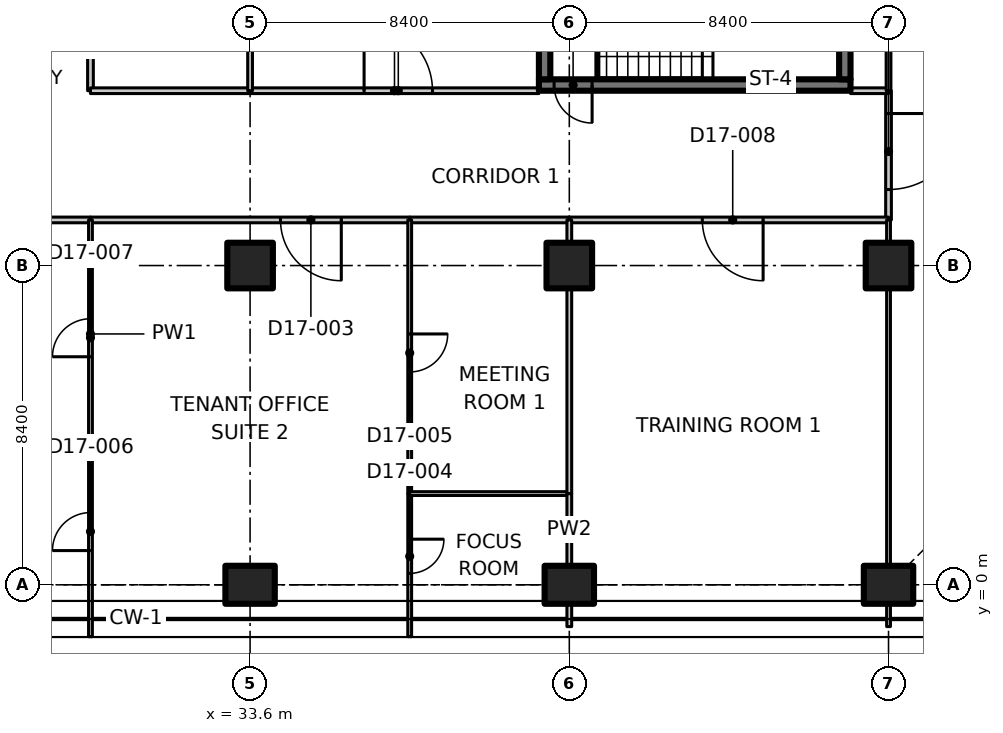
"""IFC4 building model, lengths in metres.
Left out: names, types, materials, properties, quantities, classifications, styles, units other than length and angle.
Written with IfcOpenShell. Run it as: python <this file> out.ifc"""

import sys

from ifc_helpers import new_model, si_unit, direction, frame, frame_2d, origin, origin_2d, place, context, subcontext, project, spatial, polyline, rectangle, outline, extrude, element, fill, save


model = new_model("IFC4")
c1 = context("Model", 3, precision=1e-05, world=origin(), true_north=direction((0.0, 1.0)))
c2 = subcontext(c1, "Body", "Model", "MODEL_VIEW")
j1 = project(units=[si_unit("LENGTHUNIT", "METRE"), si_unit("PLANEANGLEUNIT", "RADIAN")], contexts=[c1])
p1 = place(None, origin())
s1 = spatial("IfcSite", under=j1, at=p1, CompositionType="ELEMENT")
p2 = place(p1, origin())
s2 = spatial("IfcBuilding", under=s1, at=p2, CompositionType="ELEMENT")
p3 = place(p2, frame((0.0, 0.0, 138.5)))
s3 = spatial("IfcBuildingStorey", under=s2, at=p3, CompositionType="ELEMENT", Elevation=138.5)
p4 = place(p3, frame((33.6, 0.0, 0.0), z_axis=(0.0, 0.0, 1.0), x_axis=(0.0, 1.0, 0.0)))
e1 = element("IfcColumn", 1, at=p4, inside=s3, PredefinedType="COLUMN", context=c2, shape_type="SweptSolid", body=[
    extrude(rectangle(XDim=1.0, YDim=1.3, at=origin_2d()), origin(), (0.0, 0.0, 1.0), 3.35),
])
p5 = place(p3, frame((33.6, 8.4, 0.0), z_axis=(0.0, 0.0, 1.0), x_axis=(1.0, 0.0, 0.0)))
e2 = element("IfcColumn", 2, at=p5, inside=s3, PredefinedType="COLUMN", context=c2, shape_type="SweptSolid", body=[
    extrude(rectangle(XDim=1.2, YDim=1.2, at=origin_2d()), origin(), (0.0, 0.0, 1.0), 3.35),
])
p6 = place(p3, frame((42.0, 0.0, 0.0), z_axis=(0.0, 0.0, 1.0), x_axis=(0.0, 1.0, 0.0)))
e3 = element("IfcColumn", 3, at=p6, inside=s3, PredefinedType="COLUMN", context=c2, shape_type="SweptSolid", body=[
    extrude(rectangle(XDim=1.0, YDim=1.3, at=origin_2d()), origin(), (0.0, 0.0, 1.0), 3.35),
])
p7 = place(p3, frame((42.0, 8.4, 0.0), z_axis=(0.0, 0.0, 1.0), x_axis=(1.0, 0.0, 0.0)))
e4 = element("IfcColumn", 4, at=p7, inside=s3, PredefinedType="COLUMN", context=c2, shape_type="SweptSolid", body=[
    extrude(rectangle(XDim=1.2, YDim=1.2, at=origin_2d()), origin(), (0.0, 0.0, 1.0), 3.35),
])
p8 = place(p3, frame((50.4, 0.0, 0.0), z_axis=(0.0, 0.0, 1.0), x_axis=(0.0, 1.0, 0.0)))
e5 = element("IfcColumn", 5, at=p8, inside=s3, PredefinedType="COLUMN", context=c2, shape_type="SweptSolid", body=[
    extrude(rectangle(XDim=1.0, YDim=1.3, at=origin_2d()), origin(), (0.0, 0.0, 1.0), 3.35),
])
p9 = place(p3, frame((50.4, 8.4, 0.0), z_axis=(0.0, 0.0, 1.0), x_axis=(1.0, 0.0, 0.0)))
e6 = element("IfcColumn", 6, at=p9, inside=s3, PredefinedType="COLUMN", context=c2, shape_type="SweptSolid", body=[
    extrude(rectangle(XDim=1.2, YDim=1.2, at=origin_2d()), origin(), (0.0, 0.0, 1.0), 3.35),
])
p10 = place(p3, frame((49.4, 13.15, 0.0), z_axis=(0.0, 0.0, 1.0), x_axis=(-1.0, 0.0, 0.0)))
e7 = element("IfcWall", 7, at=p10, inside=s3, PredefinedType="SHEAR", context=c2, shape_type="SweptSolid", body=[
    extrude(rectangle(XDim=8.2, YDim=0.3, at=frame_2d((4.1, 0.0))), origin(), (0.0, 0.0, 1.0), 3.35),
])
p11 = place(p10, frame((6.8, 0.0, 0.0)))
e8 = element("IfcOpeningElement", 8, at=p11, cuts=e7, PredefinedType="OPENING", context=c2, shape_type="SweptSolid", body=[
    extrude(rectangle(XDim=1.0, YDim=2.1, at=frame_2d((0.5, 1.05))), frame((0.0, 0.16, 0.0), z_axis=(0.0, -1.0, 0.0), x_axis=(1.0, 0.0, 0.0)), (0.0, 0.0, 1.0), 0.32),
])
for number, where, z_axis, x_axis in (
    (9, (41.35, 13.3, 0.0), (0.0, 0.0, 1.0), (0.0, 1.0, 0.0)),
    (10, (49.25, 13.3, 0.0), (0.0, 0.0, 1.0), (0.0, 1.0, 0.0)),
):
    element("IfcWall", number, at=place(p3, frame(where, z_axis=z_axis, x_axis=x_axis)), inside=s3, PredefinedType="SHEAR", context=c2, shape_type="SweptSolid", body=[
        extrude(rectangle(XDim=2.55, YDim=0.3, at=frame_2d((1.275, 0.0))), origin(), (0.0, 0.0, 1.0), 3.35),
    ])
p12 = place(p3, frame((29.4, 9.6, 0.0), z_axis=(0.0, 0.0, 1.0), x_axis=(-1.0, 0.0, 0.0)))
e11 = element("IfcWall", 11, at=p12, inside=s3, PredefinedType="PARTITIONING", context=c2, shape_type="SweptSolid", body=[
    extrude(rectangle(XDim=4.2, YDim=0.15, at=frame_2d((2.1, 0.0))), origin(), (0.0, 0.0, 1.0), 3.33),
])
p13 = place(p3, frame((29.4, 21.2, 0.0), z_axis=(0.0, 0.0, 1.0), x_axis=(0.0, -1.0, 0.0)))
e12 = element("IfcWall", 12, at=p13, inside=s3, PredefinedType="PARTITIONING", context=c2, shape_type="SweptSolid", body=[
    extrude(rectangle(XDim=8.2, YDim=0.15, at=frame_2d((4.1, 0.0))), origin(), (0.0, 0.0, 1.0), 3.33),
])
p14 = place(p13, frame((3.3, 0.0, 0.0)))
e13 = element("IfcOpeningElement", 13, at=p14, cuts=e12, PredefinedType="OPENING", context=c2, shape_type="SweptSolid", body=[
    extrude(rectangle(XDim=1.6, YDim=2.1, at=frame_2d((0.8, 1.05))), frame((0.0, 0.085, 0.0), z_axis=(0.0, -1.0, 0.0), x_axis=(1.0, 0.0, 0.0)), (0.0, 0.0, 1.0), 0.17),
])
p15 = place(p3, frame((50.4, 13.0, 0.0), z_axis=(0.0, 0.0, 1.0), x_axis=(0.0, -1.0, 0.0)))
e14 = element("IfcWall", 14, at=p15, inside=s3, PredefinedType="PARTITIONING", context=c2, shape_type="SweptSolid", body=[
    extrude(rectangle(XDim=3.4, YDim=0.15, at=frame_2d((1.7, 0.0))), origin(), (0.0, 0.0, 1.0), 3.33),
])
p16 = place(p15, frame((0.6, 0.0, 0.0)))
e15 = element("IfcOpeningElement", 15, at=p16, cuts=e14, PredefinedType="OPENING", context=c2, shape_type="SweptSolid", body=[
    extrude(rectangle(XDim=2.0, YDim=2.4, at=frame_2d((1.0, 1.2))), frame((0.0, 0.085, 0.0), z_axis=(0.0, -1.0, 0.0), x_axis=(1.0, 0.0, 0.0)), (0.0, 0.0, 1.0), 0.17),
])
p17 = place(p3, frame((37.8, 9.6, 0.0), z_axis=(0.0, 0.0, 1.0), x_axis=(-1.0, 0.0, 0.0)))
e16 = element("IfcWall", 16, at=p17, inside=s3, PredefinedType="PARTITIONING", context=c2, shape_type="SweptSolid", body=[
    extrude(rectangle(XDim=8.4, YDim=0.15, at=frame_2d((4.2, 0.0))), origin(), (0.0, 0.0, 1.0), 3.33),
])
p18 = place(p17, frame((1.8, 0.0, 0.0)))
e17 = element("IfcOpeningElement", 17, at=p18, cuts=e16, PredefinedType="OPENING", context=c2, shape_type="SweptSolid", body=[
    extrude(rectangle(XDim=1.6, YDim=2.1, at=frame_2d((0.8, 1.05))), frame((0.0, 0.085, 0.0), z_axis=(0.0, -1.0, 0.0), x_axis=(1.0, 0.0, 0.0)), (0.0, 0.0, 1.0), 0.17),
])
p19 = place(p3, frame((42.0, 9.6, 0.0), z_axis=(0.0, 0.0, 1.0), x_axis=(-1.0, 0.0, 0.0)))
e18 = element("IfcWall", 18, at=p19, inside=s3, PredefinedType="PARTITIONING", context=c2, shape_type="SweptSolid", body=[
    extrude(rectangle(XDim=4.2, YDim=0.15, at=frame_2d((2.1, 0.0))), origin(), (0.0, 0.0, 1.0), 3.33),
])
p20 = place(p3, frame((50.4, 9.6, 0.0), z_axis=(0.0, 0.0, 1.0), x_axis=(-1.0, 0.0, 0.0)))
e19 = element("IfcWall", 19, at=p20, inside=s3, PredefinedType="PARTITIONING", context=c2, shape_type="SweptSolid", body=[
    extrude(rectangle(XDim=8.4, YDim=0.15, at=frame_2d((4.2, 0.0))), origin(), (0.0, 0.0, 1.0), 3.33),
])
p21 = place(p20, frame((3.3, 0.0, 0.0)))
e20 = element("IfcOpeningElement", 20, at=p21, cuts=e19, PredefinedType="OPENING", context=c2, shape_type="SweptSolid", body=[
    extrude(rectangle(XDim=1.6, YDim=2.1, at=frame_2d((0.8, 1.05))), frame((0.0, 0.085, 0.0), z_axis=(0.0, -1.0, 0.0), x_axis=(1.0, 0.0, 0.0)), (0.0, 0.0, 1.0), 0.17),
])
p22 = place(p3, frame((29.4, 13.0, 0.0), z_axis=(0.0, 0.0, 1.0), x_axis=(1.0, 0.0, 0.0)))
e21 = element("IfcWall", 21, at=p22, inside=s3, PredefinedType="PARTITIONING", context=c2, shape_type="SweptSolid", body=[
    extrude(rectangle(XDim=4.2, YDim=0.15, at=frame_2d((2.1, 0.0))), origin(), (0.0, 0.0, 1.0), 3.33),
])
p23 = place(p3, frame((33.6, 13.0, 0.0), z_axis=(0.0, 0.0, 1.0), x_axis=(1.0, 0.0, 0.0)))
e22 = element("IfcWall", 22, at=p23, inside=s3, PredefinedType="PARTITIONING", context=c2, shape_type="SweptSolid", body=[
    extrude(rectangle(XDim=7.6, YDim=0.15, at=frame_2d((3.8, 0.0))), origin(), (0.0, 0.0, 1.0), 3.33),
])
p24 = place(p23, frame((3.0, 0.0, 0.0)))
e23 = element("IfcOpeningElement", 23, at=p24, cuts=e22, PredefinedType="OPENING", context=c2, shape_type="SweptSolid", body=[
    extrude(rectangle(XDim=1.8, YDim=2.1, at=frame_2d((0.9, 1.05))), frame((0.0, 0.085, 0.0), z_axis=(0.0, -1.0, 0.0), x_axis=(1.0, 0.0, 0.0)), (0.0, 0.0, 1.0), 0.17),
])
p25 = place(p3, frame((49.4, 13.0, 0.0), z_axis=(0.0, 0.0, 1.0), x_axis=(1.0, 0.0, 0.0)))
e24 = element("IfcWall", 24, at=p25, inside=s3, PredefinedType="PARTITIONING", context=c2, shape_type="SweptSolid", body=[
    extrude(rectangle(XDim=1.0, YDim=0.15, at=frame_2d((0.5, 0.0))), origin(), (0.0, 0.0, 1.0), 3.33),
])
p26 = place(p3, frame((50.4, -1.1, 0.0), z_axis=(0.0, 0.0, 1.0), x_axis=(0.0, 1.0, 0.0)))
e25 = element("IfcWall", 25, at=p26, inside=s3, PredefinedType="PARTITIONING", context=c2, shape_type="SweptSolid", body=[
    extrude(rectangle(XDim=0.58, YDim=0.1, at=frame_2d((0.29, 0.0))), origin(), (0.0, 0.0, 1.0), 3.33),
])
p27 = place(p3, frame((50.4, 0.52, 0.0), z_axis=(0.0, 0.0, 1.0), x_axis=(0.0, 1.0, 0.0)))
e26 = element("IfcWall", 26, at=p27, inside=s3, PredefinedType="PARTITIONING", context=c2, shape_type="SweptSolid", body=[
    extrude(outline(polyline([(0.0, 0.0), (7.26, 0.0), (7.26, 3.33), (0.146, 3.33), (0.144, 2.98), (0.0, 2.98), (0.0, 0.0)])), frame((0.0, 0.05, 0.0), z_axis=(0.0, -1.0, 0.0), x_axis=(1.0, 0.0, 0.0)), (0.0, 0.0, 1.0), 0.1),
])
p28 = place(p3, frame((50.4, 9.02, 0.0), z_axis=(0.0, 0.0, 1.0), x_axis=(0.0, 1.0, 0.0)))
e27 = element("IfcWall", 27, at=p28, inside=s3, PredefinedType="PARTITIONING", context=c2, shape_type="SweptSolid", body=[
    extrude(rectangle(XDim=0.58, YDim=0.1, at=frame_2d((0.29, 0.0))), origin(), (0.0, 0.0, 1.0), 3.33),
])
p29 = place(p3, frame((50.4, 13.0, 0.0), z_axis=(0.0, 0.0, 1.0), x_axis=(0.0, 1.0, 0.0)))
e28 = element("IfcWall", 28, at=p29, inside=s3, PredefinedType="PARTITIONING", context=c2, shape_type="SweptSolid", body=[
    extrude(rectangle(XDim=3.18, YDim=0.125, at=frame_2d((1.59, 0.0))), origin(), (0.0, 0.0, 1.0), 3.33),
])
p30 = place(p3, frame((37.8, 2.4, 0.0), z_axis=(0.0, 0.0, 1.0), x_axis=(0.0, -1.0, 0.0)))
e29 = element("IfcWall", 29, at=p30, inside=s3, PredefinedType="PARTITIONING", context=c2, shape_type="SweptSolid", body=[
    extrude(rectangle(XDim=3.765, YDim=0.1, at=frame_2d((1.882, 0.0))), origin(), (0.0, 0.0, 1.0), 2.98),
])
p31 = place(p30, frame((1.2, 0.0, 0.0)))
e30 = element("IfcOpeningElement", 30, at=p31, cuts=e29, PredefinedType="OPENING", context=c2, shape_type="SweptSolid", body=[
    extrude(rectangle(XDim=0.9, YDim=2.1, at=frame_2d((0.45, 1.05))), frame((0.0, 0.06, 0.0), z_axis=(0.0, -1.0, 0.0), x_axis=(1.0, 0.0, 0.0)), (0.0, 0.0, 1.0), 0.12),
])
p32 = place(p3, frame((37.8, 9.6, 0.0), z_axis=(0.0, 0.0, 1.0), x_axis=(0.0, -1.0, 0.0)))
e31 = element("IfcWall", 31, at=p32, inside=s3, PredefinedType="PARTITIONING", context=c2, shape_type="SweptSolid", body=[
    extrude(rectangle(XDim=7.2, YDim=0.1, at=frame_2d((3.6, 0.0))), origin(), (0.0, 0.0, 1.0), 3.33),
])
p33 = place(p32, frame((3.0, 0.0, 0.0)))
e32 = element("IfcOpeningElement", 32, at=p33, cuts=e31, PredefinedType="OPENING", context=c2, shape_type="SweptSolid", body=[
    extrude(rectangle(XDim=1.0, YDim=2.1, at=frame_2d((0.5, 1.05))), frame((0.0, 0.06, 0.0), z_axis=(0.0, -1.0, 0.0), x_axis=(1.0, 0.0, 0.0)), (0.0, 0.0, 1.0), 0.12),
])
p34 = place(p3, frame((29.4, -1.365, 0.0), z_axis=(0.0, 0.0, 1.0), x_axis=(0.0, 1.0, 0.0)))
e33 = element("IfcWall", 33, at=p34, inside=s3, PredefinedType="PARTITIONING", context=c2, shape_type="SweptSolid", body=[
    extrude(outline(polyline([(0.0, 0.0), (4.965, 0.0), (4.965, 3.33), (1.815, 3.33), (1.813, 2.98), (0.917, 2.98), (0.915, 3.33), (0.265, 3.33), (0.0, 3.33), (0.0, 0.0)])), frame((0.0, 0.05, 0.0), z_axis=(0.0, -1.0, 0.0), x_axis=(1.0, 0.0, 0.0)), (0.0, 0.0, 1.0), 0.1),
])
p35 = place(p34, frame((2.265, 0.0, 0.0)))
e34 = element("IfcOpeningElement", 34, at=p35, cuts=e33, PredefinedType="OPENING", context=c2, shape_type="SweptSolid", body=[
    extrude(rectangle(XDim=1.0, YDim=2.1, at=frame_2d((0.5, 1.05))), frame((0.0, 0.06, 0.0), z_axis=(0.0, -1.0, 0.0), x_axis=(1.0, 0.0, 0.0)), (0.0, 0.0, 1.0), 0.12),
])
p36 = place(p3, frame((29.4, 3.6, 0.0), z_axis=(0.0, 0.0, 1.0), x_axis=(0.0, 1.0, 0.0)))
e35 = element("IfcWall", 35, at=p36, inside=s3, PredefinedType="PARTITIONING", context=c2, shape_type="SweptSolid", body=[
    extrude(rectangle(XDim=6.0, YDim=0.1, at=frame_2d((3.0, 0.0))), origin(), (0.0, 0.0, 1.0), 3.33),
])
p37 = place(p36, frame((2.4, 0.0, 0.0)))
e36 = element("IfcOpeningElement", 36, at=p37, cuts=e35, PredefinedType="OPENING", context=c2, shape_type="SweptSolid", body=[
    extrude(rectangle(XDim=1.0, YDim=2.1, at=frame_2d((0.5, 1.05))), frame((0.0, 0.06, 0.0), z_axis=(0.0, -1.0, 0.0), x_axis=(1.0, 0.0, 0.0)), (0.0, 0.0, 1.0), 0.12),
])
p38 = place(p3, frame((37.8, 2.4, 0.0), z_axis=(0.0, 0.0, 1.0), x_axis=(1.0, 0.0, 0.0)))
e37 = element("IfcWall", 37, at=p38, inside=s3, PredefinedType="PARTITIONING", context=c2, shape_type="SweptSolid", body=[
    extrude(rectangle(XDim=4.2, YDim=0.1, at=frame_2d((2.1, 0.0))), origin(), (0.0, 0.0, 1.0), 3.33),
])
p39 = place(p3, frame((42.0, 2.4, 0.0), z_axis=(0.0, 0.0, 1.0), x_axis=(0.0, -1.0, 0.0)))
e38 = element("IfcWall", 38, at=p39, inside=s3, PredefinedType="PARTITIONING", context=c2, shape_type="SweptSolid", body=[
    extrude(rectangle(XDim=1.88, YDim=0.125, at=frame_2d((0.94, 0.0))), origin(), (0.0, 0.0, 1.0), 3.33),
])
for number, where, z_axis, x_axis in (
    (39, (42.0, -0.52, 0.0), (0.0, 0.0, 1.0), (0.0, -1.0, 0.0)),
    (40, (42.0, 9.6, 0.0), (0.0, 0.0, 1.0), (0.0, -1.0, 0.0)),
):
    element("IfcWall", number, at=place(p3, frame(where, z_axis=z_axis, x_axis=x_axis)), inside=s3, PredefinedType="PARTITIONING", context=c2, shape_type="SweptSolid", body=[
        extrude(rectangle(XDim=0.58, YDim=0.125, at=frame_2d((0.29, 0.0))), origin(), (0.0, 0.0, 1.0), 3.33),
    ])
p40 = place(p3, frame((42.0, 7.78, 0.0), z_axis=(0.0, 0.0, 1.0), x_axis=(0.0, -1.0, 0.0)))
e41 = element("IfcWall", 41, at=p40, inside=s3, PredefinedType="PARTITIONING", context=c2, shape_type="SweptSolid", body=[
    extrude(rectangle(XDim=5.38, YDim=0.125, at=frame_2d((2.69, 0.0))), origin(), (0.0, 0.0, 1.0), 3.33),
])
p41 = place(p3, frame((25.2, 3.6, 0.0), z_axis=(0.0, 0.0, 1.0), x_axis=(1.0, 0.0, 0.0)))
e42 = element("IfcWall", 42, at=p41, inside=s3, PredefinedType="PARTITIONING", context=c2, shape_type="SweptSolid", body=[
    extrude(rectangle(XDim=4.2, YDim=0.1, at=frame_2d((2.1, 0.0))), origin(), (0.0, 0.0, 1.0), 3.33),
])
p42 = place(p3, frame((33.6, 16.18, 0.0), z_axis=(0.0, 0.0, 1.0), x_axis=(0.0, -1.0, 0.0)))
e43 = element("IfcWall", 43, at=p42, inside=s3, PredefinedType="PARTITIONING", context=c2, shape_type="SweptSolid", body=[
    extrude(rectangle(XDim=3.18, YDim=0.125, at=frame_2d((1.59, 0.0))), origin(), (0.0, 0.0, 1.0), 3.33),
])
p43 = place(p11, origin())
e44 = element("IfcDoor", 44, at=p43, inside=s3, OperationType="SINGLE_SWING_LEFT", PredefinedType="DOOR", context=c2, shape_type="SweptSolid", body=[
    extrude(rectangle(XDim=1.0, YDim=2.1, at=frame_2d((0.5, 1.05))), frame((0.0, 0.025, 0.0), z_axis=(0.0, -1.0, 0.0), x_axis=(1.0, 0.0, 0.0)), (0.0, 0.0, 1.0), 0.05),
])
fill(e8, e44)
p44 = place(p16, origin())
e45 = element("IfcDoor", 45, at=p44, inside=s3, OperationType="DOUBLE_DOOR_SINGLE_SWING", PredefinedType="DOOR", context=c2, shape_type="SweptSolid", body=[
    extrude(rectangle(XDim=2.0, YDim=2.4, at=frame_2d((1.0, 1.2))), frame((0.0, 0.025, 0.0), z_axis=(0.0, -1.0, 0.0), x_axis=(1.0, 0.0, 0.0)), (0.0, 0.0, 1.0), 0.05),
])
fill(e15, e45)
p45 = place(p18, origin())
e46 = element("IfcDoor", 46, at=p45, inside=s3, OperationType="DOUBLE_DOOR_SINGLE_SWING", PredefinedType="DOOR", context=c2, shape_type="SweptSolid", body=[
    extrude(rectangle(XDim=1.6, YDim=2.1, at=frame_2d((0.8, 1.05))), frame((0.0, 0.025, 0.0), z_axis=(0.0, -1.0, 0.0), x_axis=(1.0, 0.0, 0.0)), (0.0, 0.0, 1.0), 0.05),
])
fill(e17, e46)
p46 = place(p31, origin())
e47 = element("IfcDoor", 47, at=p46, inside=s3, OperationType="SINGLE_SWING_LEFT", PredefinedType="DOOR", context=c2, shape_type="SweptSolid", body=[
    extrude(rectangle(XDim=0.9, YDim=2.1, at=frame_2d((0.45, 1.05))), frame((0.0, 0.025, 0.0), z_axis=(0.0, -1.0, 0.0), x_axis=(1.0, 0.0, 0.0)), (0.0, 0.0, 1.0), 0.05),
])
fill(e30, e47)
p47 = place(p33, origin())
e48 = element("IfcDoor", 48, at=p47, inside=s3, OperationType="SINGLE_SWING_LEFT", PredefinedType="DOOR", context=c2, shape_type="SweptSolid", body=[
    extrude(rectangle(XDim=1.0, YDim=2.1, at=frame_2d((0.5, 1.05))), frame((0.0, 0.025, 0.0), z_axis=(0.0, -1.0, 0.0), x_axis=(1.0, 0.0, 0.0)), (0.0, 0.0, 1.0), 0.05),
])
fill(e32, e48)
p48 = place(p35, origin())
e49 = element("IfcDoor", 49, at=p48, inside=s3, OperationType="SINGLE_SWING_LEFT", PredefinedType="DOOR", context=c2, shape_type="SweptSolid", body=[
    extrude(rectangle(XDim=1.0, YDim=2.1, at=frame_2d((0.5, 1.05))), frame((0.0, 0.025, 0.0), z_axis=(0.0, -1.0, 0.0), x_axis=(1.0, 0.0, 0.0)), (0.0, 0.0, 1.0), 0.05),
])
fill(e34, e49)
p49 = place(p37, origin())
e50 = element("IfcDoor", 50, at=p49, inside=s3, OperationType="SINGLE_SWING_LEFT", PredefinedType="DOOR", context=c2, shape_type="SweptSolid", body=[
    extrude(rectangle(XDim=1.0, YDim=2.1, at=frame_2d((0.5, 1.05))), frame((0.0, 0.025, 0.0), z_axis=(0.0, -1.0, 0.0), x_axis=(1.0, 0.0, 0.0)), (0.0, 0.0, 1.0), 0.05),
])
fill(e36, e50)
p50 = place(p21, origin())
e51 = element("IfcDoor", 51, at=p50, inside=s3, OperationType="DOUBLE_DOOR_SINGLE_SWING", PredefinedType="DOOR", context=c2, shape_type="SweptSolid", body=[
    extrude(rectangle(XDim=1.6, YDim=2.1, at=frame_2d((0.8, 1.05))), frame((0.0, 0.025, 0.0), z_axis=(0.0, -1.0, 0.0), x_axis=(1.0, 0.0, 0.0)), (0.0, 0.0, 1.0), 0.05),
])
fill(e20, e51)
p51 = place(p24, origin())
e52 = element("IfcDoor", 52, at=p51, inside=s3, OperationType="DOUBLE_DOOR_SINGLE_SWING", PredefinedType="DOOR", context=c2, shape_type="SweptSolid", body=[
    extrude(rectangle(XDim=1.8, YDim=2.1, at=frame_2d((0.9, 1.05))), frame((0.0, 0.025, 0.0), z_axis=(0.0, -1.0, 0.0), x_axis=(1.0, 0.0, 0.0)), (0.0, 0.0, 1.0), 0.05),
])
fill(e23, e52)
save(model, sys.argv[1])
